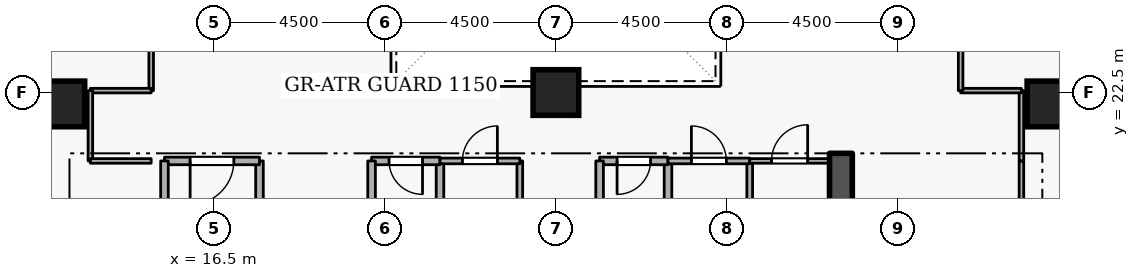
"""IFC4 building model, lengths in metres.
Left out: names, types, materials, properties, quantities, classifications, styles, units other than length and angle.
Written with IfcOpenShell. Run it as: python <this file> out.ifc"""

import sys

from ifc_helpers import new_model, si_unit, direction, frame, frame_2d, origin, origin_2d, place, context, subcontext, project, spatial, rectangle, extrude, element, fill, save


model = new_model("IFC4")
c1 = context("Model", 3, precision=1e-05, world=origin(), true_north=direction((0.0, 1.0)))
c2 = subcontext(c1, "Body", "Model", "MODEL_VIEW")
j1 = project(units=[si_unit("LENGTHUNIT", "METRE"), si_unit("PLANEANGLEUNIT", "RADIAN")], contexts=[c1])
p1 = place(None, origin())
s1 = spatial("IfcSite", under=j1, at=p1, CompositionType="ELEMENT")
p2 = place(p1, origin())
s2 = spatial("IfcBuilding", under=s1, at=p2, CompositionType="ELEMENT")
p3 = place(p2, frame((0.0, 0.0, 83.7)))
s3 = spatial("IfcBuildingStorey", under=s2, at=p3, CompositionType="ELEMENT", Elevation=83.7)
p4 = place(p3, frame((33.0, 15.2, 0.0), z_axis=(0.0, 0.0, 1.0), x_axis=(0.0, 1.0, 0.0)))
e1 = element("IfcWall", 1, at=p4, inside=s3, PredefinedType="SHEAR", context=c2, shape_type="SweptSolid", body=[
    extrude(rectangle(XDim=5.7, YDim=0.6, at=frame_2d((2.85, 0.0))), origin(), (0.0, 0.0, 1.0), 3.6),
])
for number, where, z_axis, x_axis in (
    (2, (12.5, 22.2, 0.0), (0.0, 0.0, 1.0), (1.0, 0.0, 0.0)),
    (3, (38.5, 22.2, 0.0), (0.0, 0.0, 1.0), (1.0, 0.0, 0.0)),
    (4, (25.5, 22.5, 0.0), (0.0, 0.0, 1.0), (1.0, 0.0, 0.0)),
):
    element("IfcColumn", number, at=place(p3, frame(where, z_axis=z_axis, x_axis=x_axis)), inside=s3, PredefinedType="COLUMN", context=c2, shape_type="SweptSolid", body=[
        extrude(rectangle(XDim=1.2, YDim=1.2, at=origin_2d()), origin(), (0.0, 0.0, 1.0), 3.6),
    ])
p5 = place(p3, frame((17.7, 18.4, 0.0), z_axis=(0.0, 0.0, 1.0), x_axis=(0.0, 1.0, 0.0)))
e5 = element("IfcWall", 5, at=p5, inside=s3, PredefinedType="STANDARD", context=c2, shape_type="SweptSolid", body=[
    extrude(rectangle(XDim=2.3, YDim=0.2, at=frame_2d((1.15, 0.0))), origin(), (0.0, 0.0, 1.0), 2.545),
])
p6 = place(p3, frame((17.7, 20.7, 0.0), z_axis=(0.0, 0.0, 1.0), x_axis=(-1.0, 0.0, 0.0)))
e6 = element("IfcWall", 6, at=p6, inside=s3, PredefinedType="STANDARD", context=c2, shape_type="SweptSolid", body=[
    extrude(rectangle(XDim=2.5, YDim=0.2, at=frame_2d((1.25, 0.0))), origin(), (0.0, 0.0, 1.0), 3.34),
])
p7 = place(p6, frame((0.675, 0.0, 0.0)))
e7 = element("IfcOpeningElement", 7, at=p7, cuts=e6, PredefinedType="OPENING", context=c2, shape_type="SweptSolid", body=[
    extrude(rectangle(XDim=1.15, YDim=2.1, at=frame_2d((0.575, 1.05))), frame((0.0, 0.11, 0.0), z_axis=(0.0, -1.0, 0.0), x_axis=(1.0, 0.0, 0.0)), (0.0, 0.0, 1.0), 0.22),
])
p8 = place(p3, frame((15.2, 20.7, 0.0), z_axis=(0.0, 0.0, 1.0), x_axis=(0.0, -1.0, 0.0)))
e8 = element("IfcWall", 8, at=p8, inside=s3, PredefinedType="STANDARD", context=c2, shape_type="SweptSolid", body=[
    extrude(rectangle(XDim=5.7, YDim=0.2, at=frame_2d((2.85, 0.0))), origin(), (0.0, 0.0, 1.0), 3.34),
])
p9 = place(p3, frame((28.45, 18.65, 0.0), z_axis=(0.0, 0.0, 1.0), x_axis=(0.0, 1.0, 0.0)))
e9 = element("IfcWall", 9, at=p9, inside=s3, PredefinedType="STANDARD", context=c2, shape_type="SweptSolid", body=[
    extrude(rectangle(XDim=2.05, YDim=0.2, at=frame_2d((1.025, 0.0))), origin(), (0.0, 0.0, 1.0), 3.34),
])
p10 = place(p3, frame((28.45, 20.7, 0.0), z_axis=(0.0, 0.0, 1.0), x_axis=(-1.0, 0.0, 0.0)))
e10 = element("IfcWall", 10, at=p10, inside=s3, PredefinedType="STANDARD", context=c2, shape_type="SweptSolid", body=[
    extrude(rectangle(XDim=1.8, YDim=0.2, at=frame_2d((0.9, 0.0))), origin(), (0.0, 0.0, 1.0), 3.34),
])
p11 = place(p10, frame((0.46, 0.0, 0.0)))
e11 = element("IfcOpeningElement", 11, at=p11, cuts=e10, PredefinedType="OPENING", context=c2, shape_type="SweptSolid", body=[
    extrude(rectangle(XDim=0.88, YDim=2.04, at=frame_2d((0.44, 1.02))), frame((0.0, 0.11, 0.0), z_axis=(0.0, -1.0, 0.0), x_axis=(1.0, 0.0, 0.0)), (0.0, 0.0, 1.0), 0.22),
])
for number, where, z_axis, x_axis in (
    (12, (26.65, 20.7, 0.0), (0.0, 0.0, 1.0), (0.0, -1.0, 0.0)),
    (13, (22.45, 18.65, 0.0), (0.0, 0.0, 1.0), (0.0, 1.0, 0.0)),
):
    element("IfcWall", number, at=place(p3, frame(where, z_axis=z_axis, x_axis=x_axis)), inside=s3, PredefinedType="STANDARD", context=c2, shape_type="SweptSolid", body=[
        extrude(rectangle(XDim=2.05, YDim=0.2, at=frame_2d((1.025, 0.0))), origin(), (0.0, 0.0, 1.0), 3.34),
    ])
p12 = place(p3, frame((22.45, 20.7, 0.0), z_axis=(0.0, 0.0, 1.0), x_axis=(-1.0, 0.0, 0.0)))
e14 = element("IfcWall", 14, at=p12, inside=s3, PredefinedType="STANDARD", context=c2, shape_type="SweptSolid", body=[
    extrude(rectangle(XDim=1.8, YDim=0.2, at=frame_2d((0.9, 0.0))), origin(), (0.0, 0.0, 1.0), 3.34),
])
p13 = place(p12, frame((0.46, 0.0, 0.0)))
e15 = element("IfcOpeningElement", 15, at=p13, cuts=e14, PredefinedType="OPENING", context=c2, shape_type="SweptSolid", body=[
    extrude(rectangle(XDim=0.88, YDim=2.04, at=frame_2d((0.44, 1.02))), frame((0.0, 0.11, 0.0), z_axis=(0.0, -1.0, 0.0), x_axis=(1.0, 0.0, 0.0)), (0.0, 0.0, 1.0), 0.22),
])
p14 = place(p3, frame((20.65, 20.7, 0.0), z_axis=(0.0, 0.0, 1.0), x_axis=(0.0, -1.0, 0.0)))
e16 = element("IfcWall", 16, at=p14, inside=s3, PredefinedType="STANDARD", context=c2, shape_type="SweptSolid", body=[
    extrude(rectangle(XDim=2.05, YDim=0.2, at=frame_2d((1.025, 0.0))), origin(), (0.0, 0.0, 1.0), 3.34),
])
p15 = place(p3, frame((24.55, 20.7, 0.0), z_axis=(0.0, 0.0, 1.0), x_axis=(0.0, -1.0, 0.0)))
e17 = element("IfcWall", 17, at=p15, inside=s3, PredefinedType="PARTITIONING", context=c2, shape_type="SweptSolid", body=[
    extrude(rectangle(XDim=2.05, YDim=0.15, at=frame_2d((1.025, 0.0))), origin(), (0.0, 0.0, 1.0), 3.34),
])
p16 = place(p3, frame((22.45, 20.7, 0.0), z_axis=(0.0, 0.0, 1.0), x_axis=(1.0, 0.0, 0.0)))
e18 = element("IfcWall", 18, at=p16, inside=s3, PredefinedType="PARTITIONING", context=c2, shape_type="SweptSolid", body=[
    extrude(rectangle(XDim=2.1, YDim=0.15, at=frame_2d((1.05, 0.0))), origin(), (0.0, 0.0, 1.0), 3.34),
])
p17 = place(p16, frame((0.59, 0.0, 0.0)))
e19 = element("IfcOpeningElement", 19, at=p17, cuts=e18, PredefinedType="OPENING", context=c2, shape_type="SweptSolid", body=[
    extrude(rectangle(XDim=0.92, YDim=2.08, at=frame_2d((0.46, 1.04))), frame((0.0, 0.085, 0.0), z_axis=(0.0, -1.0, 0.0), x_axis=(1.0, 0.0, 0.0)), (0.0, 0.0, 1.0), 0.17),
])
p18 = place(p3, frame((30.6, 20.7, 0.0), z_axis=(0.0, 0.0, 1.0), x_axis=(0.0, -1.0, 0.0)))
e20 = element("IfcWall", 20, at=p18, inside=s3, PredefinedType="PARTITIONING", context=c2, shape_type="SweptSolid", body=[
    extrude(rectangle(XDim=2.05, YDim=0.15, at=frame_2d((1.025, 0.0))), origin(), (0.0, 0.0, 1.0), 3.34),
])
p19 = place(p3, frame((28.45, 20.7, 0.0), z_axis=(0.0, 0.0, 1.0), x_axis=(1.0, 0.0, 0.0)))
e21 = element("IfcWall", 21, at=p19, inside=s3, PredefinedType="PARTITIONING", context=c2, shape_type="SweptSolid", body=[
    extrude(rectangle(XDim=2.15, YDim=0.15, at=frame_2d((1.075, 0.0))), origin(), (0.0, 0.0, 1.0), 3.34),
])
p20 = place(p19, frame((0.615, 0.0, 0.0)))
e22 = element("IfcOpeningElement", 22, at=p20, cuts=e21, PredefinedType="OPENING", context=c2, shape_type="SweptSolid", body=[
    extrude(rectangle(XDim=0.92, YDim=2.08, at=frame_2d((0.46, 1.04))), frame((0.0, 0.085, 0.0), z_axis=(0.0, -1.0, 0.0), x_axis=(1.0, 0.0, 0.0)), (0.0, 0.0, 1.0), 0.17),
])
p21 = place(p3, frame((30.6, 20.7, 0.0), z_axis=(0.0, 0.0, 1.0), x_axis=(1.0, 0.0, 0.0)))
e23 = element("IfcWall", 23, at=p21, inside=s3, PredefinedType="PARTITIONING", context=c2, shape_type="SweptSolid", body=[
    extrude(rectangle(XDim=2.1, YDim=0.12, at=frame_2d((1.05, 0.0))), origin(), (0.0, 0.0, 1.0), 3.34),
])
p22 = place(p21, frame((0.575, 0.0, 0.0)))
e24 = element("IfcOpeningElement", 24, at=p22, cuts=e23, PredefinedType="OPENING", context=c2, shape_type="SweptSolid", body=[
    extrude(rectangle(XDim=0.95, YDim=2.1, at=frame_2d((0.475, 1.05))), frame((0.0, 0.07, 0.0), z_axis=(0.0, -1.0, 0.0), x_axis=(1.0, 0.0, 0.0)), (0.0, 0.0, 1.0), 0.14),
])
p23 = place(p3, frame((14.85, 27.0, 0.0), z_axis=(0.0, 0.0, 1.0), x_axis=(0.0, -1.0, 0.0)))
e25 = element("IfcWall", 25, at=p23, inside=s3, PredefinedType="PARTITIONING", context=c2, shape_type="SweptSolid", body=[
    extrude(rectangle(XDim=4.45, YDim=0.12, at=frame_2d((2.225, 0.0))), origin(), (0.0, 0.0, 1.0), 3.34),
])
p24 = place(p23, frame((1.7, 0.0, 0.0)))
e26 = element("IfcOpeningElement", 26, at=p24, cuts=e25, PredefinedType="OPENING", context=c2, shape_type="SweptSolid", body=[
    extrude(rectangle(XDim=1.05, YDim=2.1, at=frame_2d((0.525, 1.05))), frame((0.0, 0.07, 0.0), z_axis=(0.0, -1.0, 0.0), x_axis=(1.0, 0.0, 0.0)), (0.0, 0.0, 1.0), 0.14),
])
p25 = place(p3, frame((14.85, 22.55, 0.0), z_axis=(0.0, 0.0, 1.0), x_axis=(-1.0, 0.0, 0.0)))
e27 = element("IfcWall", 27, at=p25, inside=s3, PredefinedType="PARTITIONING", context=c2, shape_type="SweptSolid", body=[
    extrude(rectangle(XDim=1.6, YDim=0.12, at=frame_2d((0.8, 0.0))), origin(), (0.0, 0.0, 1.0), 3.34),
])
p26 = place(p3, frame((13.25, 22.55, 0.0), z_axis=(0.0, 0.0, 1.0), x_axis=(0.0, -1.0, 0.0)))
e28 = element("IfcWall", 28, at=p26, inside=s3, PredefinedType="PARTITIONING", context=c2, shape_type="SweptSolid", body=[
    extrude(rectangle(XDim=1.85, YDim=0.12, at=frame_2d((0.925, 0.0))), origin(), (0.0, 0.0, 1.0), 3.34),
])
p27 = place(p3, frame((13.25, 20.7, 0.0), z_axis=(0.0, 0.0, 1.0), x_axis=(1.0, 0.0, 0.0)))
e29 = element("IfcWall", 29, at=p27, inside=s3, PredefinedType="PARTITIONING", context=c2, shape_type="SweptSolid", body=[
    extrude(rectangle(XDim=1.6, YDim=0.12, at=frame_2d((0.8, 0.0))), origin(), (0.0, 0.0, 1.0), 3.34),
])
p28 = place(p3, frame((37.75, 17.55, 0.0), z_axis=(0.0, 0.0, 1.0), x_axis=(0.0, 1.0, 0.0)))
e30 = element("IfcWall", 30, at=p28, inside=s3, PredefinedType="PARTITIONING", context=c2, shape_type="SweptSolid", body=[
    extrude(rectangle(XDim=3.15, YDim=0.12, at=frame_2d((1.575, 0.0))), origin(), (0.0, 0.0, 1.0), 3.34),
])
p29 = place(p3, frame((37.75, 20.7, 0.0), z_axis=(0.0, 0.0, 1.0), x_axis=(0.0, 1.0, 0.0)))
e31 = element("IfcWall", 31, at=p29, inside=s3, PredefinedType="PARTITIONING", context=c2, shape_type="SweptSolid", body=[
    extrude(rectangle(XDim=1.85, YDim=0.12, at=frame_2d((0.925, 0.0))), origin(), (0.0, 0.0, 1.0), 3.34),
])
p30 = place(p3, frame((37.75, 22.55, 0.0), z_axis=(0.0, 0.0, 1.0), x_axis=(-1.0, 0.0, 0.0)))
e32 = element("IfcWall", 32, at=p30, inside=s3, PredefinedType="PARTITIONING", context=c2, shape_type="SweptSolid", body=[
    extrude(rectangle(XDim=1.6, YDim=0.12, at=frame_2d((0.8, 0.0))), origin(), (0.0, 0.0, 1.0), 3.34),
])
p31 = place(p3, frame((36.15, 22.55, 0.0), z_axis=(0.0, 0.0, 1.0), x_axis=(0.0, 1.0, 0.0)))
e33 = element("IfcWall", 33, at=p31, inside=s3, PredefinedType="PARTITIONING", context=c2, shape_type="SweptSolid", body=[
    extrude(rectangle(XDim=4.45, YDim=0.12, at=frame_2d((2.225, 0.0))), origin(), (0.0, 0.0, 1.0), 3.34),
])
p32 = place(p31, frame((1.7, 0.0, 0.0)))
e34 = element("IfcOpeningElement", 34, at=p32, cuts=e33, PredefinedType="OPENING", context=c2, shape_type="SweptSolid", body=[
    extrude(rectangle(XDim=1.05, YDim=2.1, at=frame_2d((0.525, 1.05))), frame((0.0, 0.07, 0.0), z_axis=(0.0, -1.0, 0.0), x_axis=(1.0, 0.0, 0.0)), (0.0, 0.0, 1.0), 0.14),
])
p33 = place(p7, origin())
e35 = element("IfcDoor", 35, at=p33, inside=s3, OperationType="SINGLE_SWING_RIGHT", PredefinedType="DOOR", context=c2, shape_type="SweptSolid", body=[
    extrude(rectangle(XDim=1.15, YDim=2.1, at=frame_2d((0.575, 1.05))), frame((0.0, 0.025, 0.0), z_axis=(0.0, -1.0, 0.0), x_axis=(1.0, 0.0, 0.0)), (0.0, 0.0, 1.0), 0.05),
])
fill(e7, e35)
p34 = place(p11, origin())
e36 = element("IfcDoor", 36, at=p34, inside=s3, OperationType="SINGLE_SWING_RIGHT", PredefinedType="DOOR", context=c2, shape_type="SweptSolid", body=[
    extrude(rectangle(XDim=0.88, YDim=2.04, at=frame_2d((0.44, 1.02))), frame((0.0, 0.025, 0.0), z_axis=(0.0, -1.0, 0.0), x_axis=(1.0, 0.0, 0.0)), (0.0, 0.0, 1.0), 0.05),
])
fill(e11, e36)
p35 = place(p13, origin())
e37 = element("IfcDoor", 37, at=p35, inside=s3, OperationType="SINGLE_SWING_LEFT", PredefinedType="DOOR", context=c2, shape_type="SweptSolid", body=[
    extrude(rectangle(XDim=0.88, YDim=2.04, at=frame_2d((0.44, 1.02))), frame((0.0, 0.025, 0.0), z_axis=(0.0, -1.0, 0.0), x_axis=(1.0, 0.0, 0.0)), (0.0, 0.0, 1.0), 0.05),
])
fill(e15, e37)
p36 = place(p17, origin())
e38 = element("IfcDoor", 38, at=p36, inside=s3, OperationType="SINGLE_SWING_RIGHT", PredefinedType="DOOR", context=c2, shape_type="SweptSolid", body=[
    extrude(rectangle(XDim=0.92, YDim=2.08, at=frame_2d((0.46, 1.04))), frame((0.0, 0.025, 0.0), z_axis=(0.0, -1.0, 0.0), x_axis=(1.0, 0.0, 0.0)), (0.0, 0.0, 1.0), 0.05),
])
fill(e19, e38)
p37 = place(p20, origin())
e39 = element("IfcDoor", 39, at=p37, inside=s3, OperationType="SINGLE_SWING_LEFT", PredefinedType="DOOR", context=c2, shape_type="SweptSolid", body=[
    extrude(rectangle(XDim=0.92, YDim=2.08, at=frame_2d((0.46, 1.04))), frame((0.0, 0.025, 0.0), z_axis=(0.0, -1.0, 0.0), x_axis=(1.0, 0.0, 0.0)), (0.0, 0.0, 1.0), 0.05),
])
fill(e22, e39)
p38 = place(p22, origin())
e40 = element("IfcDoor", 40, at=p38, inside=s3, OperationType="SINGLE_SWING_RIGHT", PredefinedType="DOOR", context=c2, shape_type="SweptSolid", body=[
    extrude(rectangle(XDim=0.95, YDim=2.1, at=frame_2d((0.475, 1.05))), frame((0.0, 0.025, 0.0), z_axis=(0.0, -1.0, 0.0), x_axis=(1.0, 0.0, 0.0)), (0.0, 0.0, 1.0), 0.05),
])
fill(e24, e40)
save(model, sys.argv[1])
